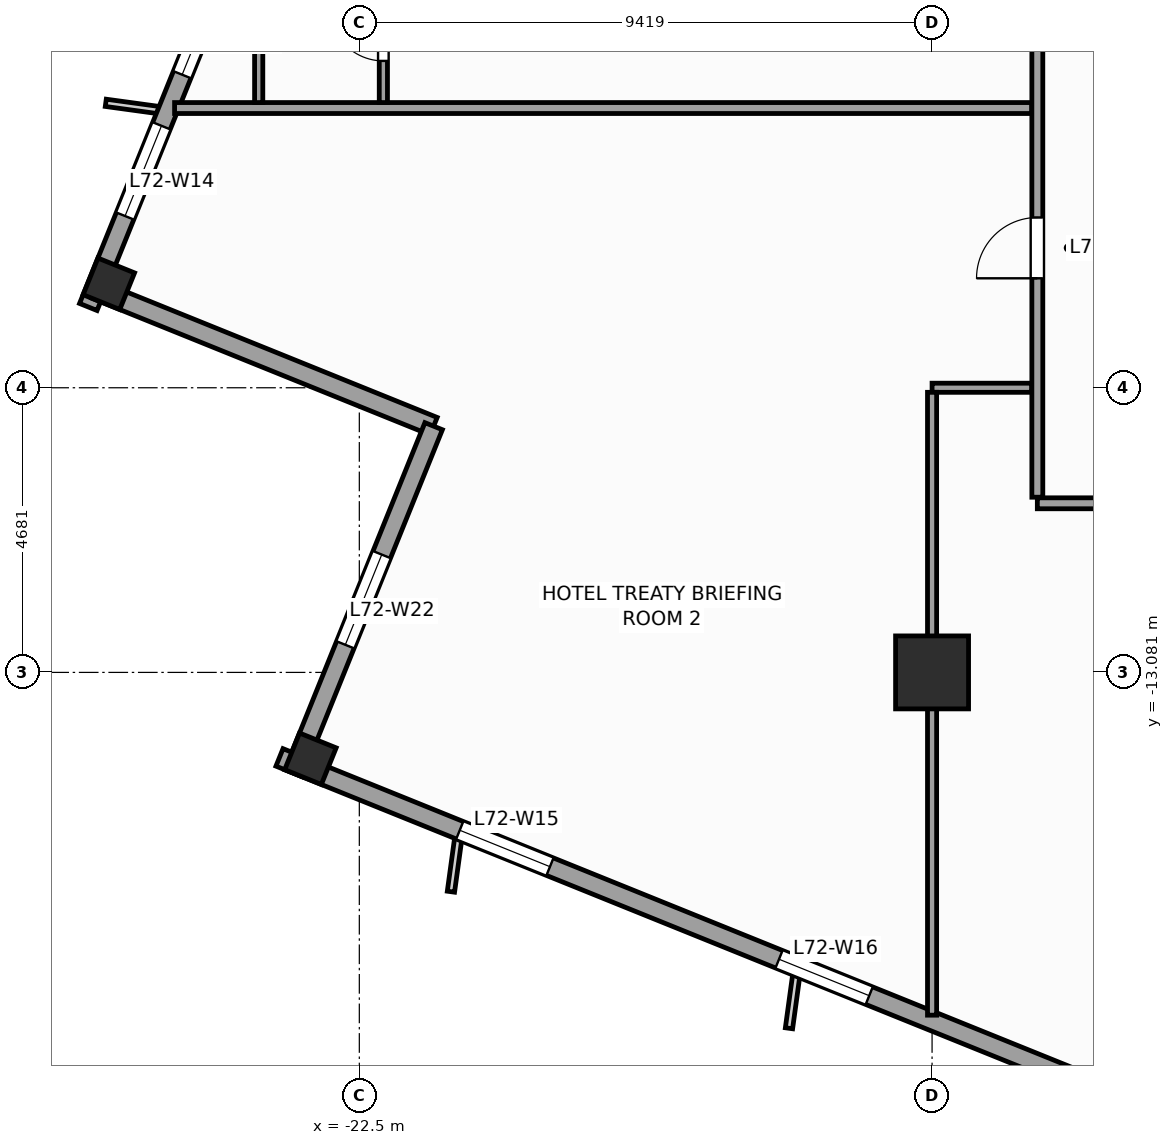
"""IFC4 building model, lengths in metres.
Left out: names, types, materials, properties, quantities, classifications, styles, units other than length and angle.
Written with IfcOpenShell. Run it as: python <this file> out.ifc"""

import sys

from ifc_helpers import new_model, si_unit, direction, frame, frame_2d, origin, origin_2d, place, context, subcontext, project, spatial, rectangle, extrude, source, transform, mapped, element, fill, save


model = new_model("IFC4")
c1 = context("Model", 3, precision=1e-05, world=origin(), true_north=direction((0.0, 1.0)))
c2 = subcontext(c1, "Body", "Model", "MODEL_VIEW")
j1 = project(units=[si_unit("LENGTHUNIT", "METRE"), si_unit("PLANEANGLEUNIT", "RADIAN")], contexts=[c1])
p1 = place(None, origin())
s1 = spatial("IfcSite", under=j1, at=p1, CompositionType="ELEMENT")
p2 = place(p1, origin())
s2 = spatial("IfcBuilding", under=s1, at=p2, CompositionType="ELEMENT")
p3 = place(p2, frame((0.0, 0.0, 294.0)))
s3 = spatial("IfcBuildingStorey", under=s2, at=p3, CompositionType="ELEMENT", Elevation=294.0)
m1 = source(origin(), c2, "Body", "SweptSolid", [
    extrude(rectangle(XDim=1.2, YDim=1.2, at=origin_2d()), origin(), (0.0, 0.0, 1.0), 3.6),
])
p4 = place(p3, frame((-13.081, -13.081, 0.0), z_axis=(0.0, 0.0, 1.0), x_axis=(1.0, 0.0, 0.0)))
e1 = element("IfcColumn", 1, at=p4, inside=s3, PredefinedType="COLUMN", context=c2, shape_type="MappedRepresentation", body=[
    mapped(m1, transform((0.0, 0.0, 0.0), scale=1.0)),
])
m2 = source(origin(), c2, "Body", "SweptSolid", [
    extrude(rectangle(XDim=0.65, YDim=0.65, at=origin_2d()), origin(), (0.0, 0.0, 1.0), 3.6),
])
for number, where, z_axis, x_axis in (
    (2, (-26.62, -6.69, 0.0), (0.0, 0.0, 1.0), (0.375, 0.927, 0.0)),
    (3, (-23.304, -14.501, 0.0), (0.0, 0.0, 1.0), (0.375, 0.927, 0.0)),
):
    element("IfcColumn", number, at=place(p3, frame(where, z_axis=z_axis, x_axis=x_axis)), inside=s3, PredefinedType="COLUMN", context=c2, shape_type="MappedRepresentation", body=[
        mapped(m2, transform((0.0, 0.0, 0.0), scale=1.0)),
    ])
p5 = place(p3, frame((-14.479, 23.813, 0.0), z_axis=(0.0, 0.0, 1.0), x_axis=(-0.374609557019, -0.927182657188, 0.0)))
e4 = element("IfcWall", 4, at=p5, inside=s3, PredefinedType="STANDARD", context=c2, shape_type="SweptSolid", body=[
    extrude(rectangle(XDim=33.31, YDim=0.31, at=frame_2d((16.655, 0.0))), origin(), (0.0, 0.0, 1.0), 2.75),
])
p6 = place(p5, frame((10.53, 0.0, 0.0)))
e5 = element("IfcOpeningElement", 5, at=p6, cuts=e4, PredefinedType="OPENING", context=c2, shape_type="SweptSolid", body=[
    extrude(rectangle(XDim=1.05, YDim=2.25, at=frame_2d((0.525, 1.125))), frame((0.0, 0.165, 0.0), z_axis=(0.0, -1.0, 0.0), x_axis=(1.0, 0.0, 0.0)), (0.0, 0.0, 1.0), 0.33),
])
p7 = place(p5, frame((3.197, 0.0, 0.47)))
e6 = element("IfcOpeningElement", 6, at=p7, cuts=e4, PredefinedType="OPENING", context=c2, shape_type="SweptSolid", body=[
    extrude(rectangle(XDim=1.6, YDim=2.1, at=frame_2d((0.8, 1.05))), frame((0.0, 0.165, 0.0), z_axis=(0.0, -1.0, 0.0), x_axis=(1.0, 0.0, 0.0)), (0.0, 0.0, 1.0), 0.33),
])
p8 = place(p5, frame((7.36, 0.0, 0.47)))
e7 = element("IfcOpeningElement", 7, at=p8, cuts=e4, PredefinedType="OPENING", context=c2, shape_type="SweptSolid", body=[
    extrude(rectangle(XDim=1.6, YDim=2.1, at=frame_2d((0.8, 1.05))), frame((0.0, 0.165, 0.0), z_axis=(0.0, -1.0, 0.0), x_axis=(1.0, 0.0, 0.0)), (0.0, 0.0, 1.0), 0.33),
])
p9 = place(p5, frame((14.439, 0.0, 0.47)))
e8 = element("IfcOpeningElement", 8, at=p9, cuts=e4, PredefinedType="OPENING", context=c2, shape_type="SweptSolid", body=[
    extrude(rectangle(XDim=1.6, YDim=2.1, at=frame_2d((0.8, 1.05))), frame((0.0, 0.165, 0.0), z_axis=(0.0, -1.0, 0.0), x_axis=(1.0, 0.0, 0.0)), (0.0, 0.0, 1.0), 0.33),
])
p10 = place(p5, frame((23.351, 0.0, 0.47)))
e9 = element("IfcOpeningElement", 9, at=p10, cuts=e4, PredefinedType="OPENING", context=c2, shape_type="SweptSolid", body=[
    extrude(rectangle(XDim=1.6, YDim=2.1, at=frame_2d((0.8, 1.05))), frame((0.0, 0.165, 0.0), z_axis=(0.0, -1.0, 0.0), x_axis=(1.0, 0.0, 0.0)), (0.0, 0.0, 1.0), 0.33),
])
p11 = place(p5, frame((30.097, 0.0, 0.47)))
e10 = element("IfcOpeningElement", 10, at=p11, cuts=e4, PredefinedType="OPENING", context=c2, shape_type="SweptSolid", body=[
    extrude(rectangle(XDim=1.6, YDim=2.1, at=frame_2d((0.8, 1.05))), frame((0.0, 0.165, 0.0), z_axis=(0.0, -1.0, 0.0), x_axis=(1.0, 0.0, 0.0)), (0.0, 0.0, 1.0), 0.33),
])
p12 = place(p5, frame((27.59, 0.0, 0.47)))
e11 = element("IfcOpeningElement", 11, at=p12, cuts=e4, PredefinedType="OPENING", context=c2, shape_type="SweptSolid", body=[
    extrude(rectangle(XDim=1.6, YDim=2.1, at=frame_2d((0.8, 1.05))), frame((0.0, 0.165, 0.0), z_axis=(0.0, -1.0, 0.0), x_axis=(1.0, 0.0, 0.0)), (0.0, 0.0, 1.0), 0.33),
])
p13 = place(p3, frame((-26.841, -6.784, 0.0), z_axis=(0.0, 0.0, 1.0), x_axis=(0.927171722085, -0.374636620962, 0.0)))
e12 = element("IfcWall", 12, at=p13, inside=s3, PredefinedType="STANDARD", context=c2, shape_type="SweptSolid", body=[
    extrude(rectangle(XDim=6.0, YDim=0.31, at=frame_2d((3.0, 0.0))), origin(), (0.0, 0.0, 1.0), 2.65),
])
p14 = place(p3, frame((-21.278, -9.032, 0.0), z_axis=(0.0, 0.0, 1.0), x_axis=(-0.374602739196, -0.927185411764, 0.0)))
e13 = element("IfcWall", 13, at=p14, inside=s3, PredefinedType="STANDARD", context=c2, shape_type="SweptSolid", body=[
    extrude(rectangle(XDim=6.155, YDim=0.31, at=frame_2d((3.078, 0.0))), origin(), (0.0, 0.0, 1.0), 3.35),
])
p15 = place(p14, frame((2.278, 0.0, 0.47)))
e14 = element("IfcOpeningElement", 14, at=p15, cuts=e13, PredefinedType="OPENING", context=c2, shape_type="SweptSolid", body=[
    extrude(rectangle(XDim=1.6, YDim=2.1, at=frame_2d((0.8, 1.05))), frame((0.0, 0.165, 0.0), z_axis=(0.0, -1.0, 0.0), x_axis=(1.0, 0.0, 0.0)), (0.0, 0.0, 1.0), 0.33),
])
p16 = place(p3, frame((-23.813, -14.479, 0.0), z_axis=(0.0, 0.0, 1.0), x_axis=(0.927182657188, -0.374609557019, 0.0)))
e15 = element("IfcWall", 15, at=p16, inside=s3, PredefinedType="STANDARD", context=c2, shape_type="SweptSolid", body=[
    extrude(rectangle(XDim=33.31, YDim=0.31, at=frame_2d((16.655, 0.0))), origin(), (0.0, 0.0, 1.0), 2.75),
])
p17 = place(p16, frame((3.197, 0.0, 0.47)))
e16 = element("IfcOpeningElement", 16, at=p17, cuts=e15, PredefinedType="OPENING", context=c2, shape_type="SweptSolid", body=[
    extrude(rectangle(XDim=1.6, YDim=2.1, at=frame_2d((0.8, 1.05))), frame((0.0, 0.165, 0.0), z_axis=(0.0, -1.0, 0.0), x_axis=(1.0, 0.0, 0.0)), (0.0, 0.0, 1.0), 0.33),
])
p18 = place(p16, frame((8.86, 0.0, 0.47)))
e17 = element("IfcOpeningElement", 17, at=p18, cuts=e15, PredefinedType="OPENING", context=c2, shape_type="SweptSolid", body=[
    extrude(rectangle(XDim=1.6, YDim=2.1, at=frame_2d((0.8, 1.05))), frame((0.0, 0.165, 0.0), z_axis=(0.0, -1.0, 0.0), x_axis=(1.0, 0.0, 0.0)), (0.0, 0.0, 1.0), 0.33),
])
p19 = place(p16, frame((14.439, 0.0, 0.47)))
e18 = element("IfcOpeningElement", 18, at=p19, cuts=e15, PredefinedType="OPENING", context=c2, shape_type="SweptSolid", body=[
    extrude(rectangle(XDim=1.6, YDim=2.1, at=frame_2d((0.8, 1.05))), frame((0.0, 0.165, 0.0), z_axis=(0.0, -1.0, 0.0), x_axis=(1.0, 0.0, 0.0)), (0.0, 0.0, 1.0), 0.33),
])
p20 = place(p16, frame((21.851, 0.0, 0.47)))
e19 = element("IfcOpeningElement", 19, at=p20, cuts=e15, PredefinedType="OPENING", context=c2, shape_type="SweptSolid", body=[
    extrude(rectangle(XDim=1.6, YDim=2.1, at=frame_2d((0.8, 1.05))), frame((0.0, 0.165, 0.0), z_axis=(0.0, -1.0, 0.0), x_axis=(1.0, 0.0, 0.0)), (0.0, 0.0, 1.0), 0.33),
])
p21 = place(p16, frame((27.847, 0.0, 0.47)))
e20 = element("IfcOpeningElement", 20, at=p21, cuts=e15, PredefinedType="OPENING", context=c2, shape_type="SweptSolid", body=[
    extrude(rectangle(XDim=1.6, YDim=2.1, at=frame_2d((0.8, 1.05))), frame((0.0, 0.165, 0.0), z_axis=(0.0, -1.0, 0.0), x_axis=(1.0, 0.0, 0.0)), (0.0, 0.0, 1.0), 0.33),
])
p22 = place(p3, frame((-11.35, -10.3, 0.0), z_axis=(0.0, 0.0, 1.0), x_axis=(1.0, 0.0, 0.0)))
e21 = element("IfcWall", 21, at=p22, inside=s3, PredefinedType="PARTITIONING", context=c2, shape_type="SweptSolid", body=[
    extrude(rectangle(XDim=22.8, YDim=0.18, at=frame_2d((11.4, 0.0))), origin(), (0.0, 0.0, 1.0), 3.35),
])
p23 = place(p22, frame((12.336, 0.0, 0.0)))
e22 = element("IfcOpeningElement", 22, at=p23, cuts=e21, PredefinedType="OPENING", context=c2, shape_type="SweptSolid", body=[
    extrude(rectangle(XDim=0.95, YDim=2.1, at=frame_2d((0.475, 1.05))), frame((0.0, 0.1, 0.0), z_axis=(0.0, -1.0, 0.0), x_axis=(1.0, 0.0, 0.0)), (0.0, 0.0, 1.0), 0.2),
])
p24 = place(p22, frame((17.71, 0.0, 0.0)))
e23 = element("IfcOpeningElement", 23, at=p24, cuts=e21, PredefinedType="OPENING", context=c2, shape_type="SweptSolid", body=[
    extrude(rectangle(XDim=1.0, YDim=2.15, at=frame_2d((0.5, 1.075))), frame((0.0, 0.1, 0.0), z_axis=(0.0, -1.0, 0.0), x_axis=(1.0, 0.0, 0.0)), (0.0, 0.0, 1.0), 0.2),
])
p25 = place(p22, frame((5.339, 0.0, 0.0)))
e24 = element("IfcOpeningElement", 24, at=p25, cuts=e21, PredefinedType="OPENING", context=c2, shape_type="SweptSolid", body=[
    extrude(rectangle(XDim=1.0, YDim=2.15, at=frame_2d((0.5, 1.075))), frame((0.0, 0.1, 0.0), z_axis=(0.0, -1.0, 0.0), x_axis=(1.0, 0.0, 0.0)), (0.0, 0.0, 1.0), 0.2),
])
p26 = place(p3, frame((-11.35, -10.2, 0.0), z_axis=(0.0, 0.0, 1.0), x_axis=(0.0, 1.0, 0.0)))
e25 = element("IfcWall", 25, at=p26, inside=s3, PredefinedType="PARTITIONING", context=c2, shape_type="SweptSolid", body=[
    extrude(rectangle(XDim=22.55, YDim=0.18, at=frame_2d((11.275, 0.0))), origin(), (0.0, 0.0, 1.0), 3.35),
])
p27 = place(p26, frame((11.6, 0.0, 0.0)))
e26 = element("IfcOpeningElement", 26, at=p27, cuts=e25, PredefinedType="OPENING", context=c2, shape_type="SweptSolid", body=[
    extrude(rectangle(XDim=1.0, YDim=2.15, at=frame_2d((0.5, 1.075))), frame((0.0, 0.1, 0.0), z_axis=(0.0, -1.0, 0.0), x_axis=(1.0, 0.0, 0.0)), (0.0, 0.0, 1.0), 0.2),
])
p28 = place(p26, frame((15.8, 0.0, 0.0)))
e27 = element("IfcOpeningElement", 27, at=p28, cuts=e25, PredefinedType="OPENING", context=c2, shape_type="SweptSolid", body=[
    extrude(rectangle(XDim=1.0, YDim=2.15, at=frame_2d((0.5, 1.075))), frame((0.0, 0.1, 0.0), z_axis=(0.0, -1.0, 0.0), x_axis=(1.0, 0.0, 0.0)), (0.0, 0.0, 1.0), 0.2),
])
p29 = place(p26, frame((3.6, 0.0, 0.0)))
e28 = element("IfcOpeningElement", 28, at=p29, cuts=e25, PredefinedType="OPENING", context=c2, shape_type="SweptSolid", body=[
    extrude(rectangle(XDim=1.0, YDim=2.15, at=frame_2d((0.5, 1.075))), frame((0.0, 0.1, 0.0), z_axis=(0.0, -1.0, 0.0), x_axis=(1.0, 0.0, 0.0)), (0.0, 0.0, 1.0), 0.2),
])
p30 = place(p26, frame((7.8, 0.0, 0.0)))
e29 = element("IfcOpeningElement", 29, at=p30, cuts=e25, PredefinedType="OPENING", context=c2, shape_type="SweptSolid", body=[
    extrude(rectangle(XDim=1.0, YDim=2.15, at=frame_2d((0.5, 1.075))), frame((0.0, 0.1, 0.0), z_axis=(0.0, -1.0, 0.0), x_axis=(1.0, 0.0, 0.0)), (0.0, 0.0, 1.0), 0.2),
])
p31 = place(p3, frame((-11.445, -3.8, 0.0), z_axis=(0.0, 0.0, 1.0), x_axis=(-1.0, 0.0, 0.0)))
e30 = element("IfcWall", 30, at=p31, inside=s3, PredefinedType="PARTITIONING", context=c2, shape_type="SweptSolid", body=[
    extrude(rectangle(XDim=14.093, YDim=0.18, at=frame_2d((7.046, 0.0))), origin(), (0.0, 0.0, 1.0), 3.35),
])
p32 = place(p3, frame((-11.445, -8.4, 0.0), z_axis=(0.0, 0.0, 1.0), x_axis=(-1.0, 0.0, 0.0)))
e31 = element("IfcWall", 31, at=p32, inside=s3, PredefinedType="PARTITIONING", context=c2, shape_type="SweptSolid", body=[
    extrude(rectangle(XDim=1.636, YDim=0.15, at=frame_2d((0.818, 0.0))), origin(), (0.0, 0.0, 1.0), 3.35),
])
p33 = place(p3, frame((-13.081, -8.475, 0.0), z_axis=(0.0, 0.0, 1.0), x_axis=(0.0, -1.0, 0.0)))
e32 = element("IfcWall", 32, at=p33, inside=s3, PredefinedType="PARTITIONING", context=c2, shape_type="SweptSolid", body=[
    extrude(rectangle(XDim=10.243, YDim=0.15, at=frame_2d((5.121, 0.0))), origin(), (0.0, 0.0, 1.0), 2.45),
])
p34 = place(p3, frame((-22.105, -3.71, 0.0), z_axis=(0.0, 0.0, 1.0), x_axis=(0.0, 1.0, 0.0)))
e33 = element("IfcWall", 33, at=p34, inside=s3, PredefinedType="PARTITIONING", context=c2, shape_type="SweptSolid", body=[
    extrude(rectangle(XDim=2.25, YDim=0.135, at=frame_2d((1.125, 0.0))), origin(), (0.0, 0.0, 1.0), 3.35),
])
p35 = place(p34, frame((0.685, 0.0, 0.0)))
e34 = element("IfcOpeningElement", 34, at=p35, cuts=e33, PredefinedType="OPENING", context=c2, shape_type="SweptSolid", body=[
    extrude(rectangle(XDim=0.88, YDim=2.1, at=frame_2d((0.44, 1.05))), frame((0.0, 0.078, 0.0), z_axis=(0.0, -1.0, 0.0), x_axis=(1.0, 0.0, 0.0)), (0.0, 0.0, 1.0), 0.155),
])
p36 = place(p3, frame((-24.155, -3.71, 0.0), z_axis=(0.0, 0.0, 1.0), x_axis=(0.0, 1.0, 0.0)))
e35 = element("IfcWall", 35, at=p36, inside=s3, PredefinedType="PARTITIONING", context=c2, shape_type="SweptSolid", body=[
    extrude(rectangle(XDim=2.25, YDim=0.135, at=frame_2d((1.125, 0.0))), origin(), (0.0, 0.0, 1.0), 3.35),
])
m3 = source(origin(), c2, "Body", "SweptSolid", [
    extrude(rectangle(XDim=1.6, YDim=2.1, at=frame_2d((0.8, 1.05))), frame((0.0, 0.03, 0.0), z_axis=(0.0, -1.0, 0.0), x_axis=(1.0, 0.0, 0.0)), (0.0, 0.0, 1.0), 0.06),
])
p37 = place(p11, origin())
e36 = element("IfcWindow", 36, at=p37, inside=s3, PartitioningType="SINGLE_PANEL", PredefinedType="WINDOW", context=c2, shape_type="MappedRepresentation", body=[
    mapped(m3, transform((0.0, 0.0, 0.0), scale=1.0)),
])
fill(e10, e36)
p38 = place(p17, origin())
e37 = element("IfcWindow", 37, at=p38, inside=s3, PartitioningType="SINGLE_PANEL", PredefinedType="WINDOW", context=c2, shape_type="MappedRepresentation", body=[
    mapped(m3, transform((0.0, 0.0, 0.0), scale=1.0)),
])
fill(e16, e37)
p39 = place(p18, origin())
e38 = element("IfcWindow", 38, at=p39, inside=s3, PartitioningType="SINGLE_PANEL", PredefinedType="WINDOW", context=c2, shape_type="MappedRepresentation", body=[
    mapped(m3, transform((0.0, 0.0, 0.0), scale=1.0)),
])
fill(e17, e38)
p40 = place(p15, origin())
e39 = element("IfcWindow", 39, at=p40, inside=s3, PartitioningType="SINGLE_PANEL", PredefinedType="WINDOW", context=c2, shape_type="MappedRepresentation", body=[
    mapped(m3, transform((0.0, 0.0, 0.0), scale=1.0)),
])
fill(e14, e39)
m4 = source(origin(), c2, "Body", "SweptSolid", [
    extrude(rectangle(XDim=1.0, YDim=2.15, at=frame_2d((0.5, 1.075))), frame((0.0, 0.025, 0.0), z_axis=(0.0, -1.0, 0.0), x_axis=(1.0, 0.0, 0.0)), (0.0, 0.0, 1.0), 0.05),
])
p41 = place(p29, origin())
e40 = element("IfcDoor", 40, at=p41, inside=s3, OperationType="SINGLE_SWING_LEFT", PredefinedType="DOOR", context=c2, shape_type="MappedRepresentation", body=[
    mapped(m4, transform((0.0, 0.0, 0.0), scale=1.0)),
])
fill(e28, e40)
m5 = source(origin(), c2, "Body", "SweptSolid", [
    extrude(rectangle(XDim=0.88, YDim=2.1, at=frame_2d((0.44, 1.05))), frame((0.0, 0.025, 0.0), z_axis=(0.0, -1.0, 0.0), x_axis=(1.0, 0.0, 0.0)), (0.0, 0.0, 1.0), 0.05),
])
p42 = place(p35, origin())
e41 = element("IfcDoor", 41, at=p42, inside=s3, OperationType="SINGLE_SWING_RIGHT", PredefinedType="DOOR", context=c2, shape_type="MappedRepresentation", body=[
    mapped(m5, transform((0.0, 0.0, 0.0), scale=1.0)),
])
fill(e34, e41)
p43 = place(p12, origin())
e42 = element("IfcWindow", 42, at=p43, inside=s3, PartitioningType="SINGLE_PANEL", PredefinedType="WINDOW", context=c2, shape_type="MappedRepresentation", body=[
    mapped(m3, transform((0.0, 0.0, 0.0), scale=1.0)),
])
fill(e11, e42)
save(model, sys.argv[1])
